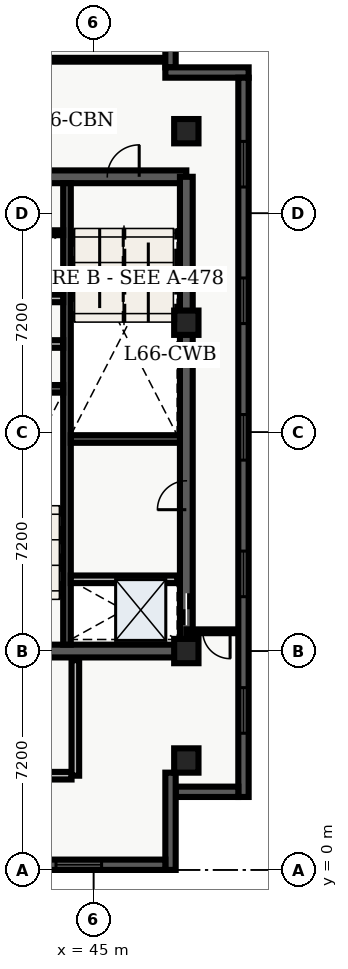
"""IFC4 building model, lengths in metres.
Left out: names, types, materials, properties, quantities, classifications, styles, units other than length and angle.
Written with IfcOpenShell. Run it as: python <this file> out.ifc"""

import sys

from ifc_helpers import new_model, entity, si_unit, converted_unit, direction, frame, origin_with_axes, origin_2d_with_axis, place, context, subcontext, project, spatial, polyline, rectangle, outline, extrude, element, fill, save


model = new_model("IFC4")
c1 = context("Model", 3, precision=1e-05, world=origin_with_axes(), true_north=direction((0.0, 1.0)))
c2 = subcontext(c1, "Body", "Model", "MODEL_VIEW")
j1 = project(units=[si_unit("LENGTHUNIT", "METRE"), converted_unit("PLANEANGLEUNIT", "DEGREE", entity("IfcPlaneAngleMeasure", 0.017), si_unit("PLANEANGLEUNIT", "RADIAN"), dimensions=[0, 0, 0, 0, 0, 0, 0])], contexts=[c1])
p1 = place(None, origin_with_axes())
s1 = spatial("IfcSite", under=j1, at=p1, CompositionType="ELEMENT")
p2 = place(p1, origin_with_axes())
s2 = spatial("IfcBuilding", under=s1, at=p2, CompositionType="ELEMENT")
p3 = place(p2, frame((0.0, 0.0, 268.5), z_axis=(0.0, 0.0, 1.0), x_axis=(1.0, 0.0, 0.0)))
s3 = spatial("IfcBuildingStorey", under=s2, at=p3, CompositionType="ELEMENT", Elevation=268.5)
p4 = place(p3, frame((40.2, 7.2, 0.0), z_axis=(0.0, 0.0, 1.0), x_axis=(1.0, 0.0, 0.0)))
e1 = element("IfcWall", 1, at=p4, inside=s3, PredefinedType="SHEAR", context=c2, shape_type="SweptSolid", body=[
    extrude(outline(polyline([(0.0, -0.21), (7.85, -0.21), (7.85, 0.21), (0.0, 0.21), (0.0, -0.21)])), origin_with_axes(), (0.0, 0.0, 1.0), 3.66),
])
p5 = place(p4, frame((2.175, 0.0, 0.0), z_axis=(0.0, 0.0, 1.0), x_axis=(1.0, 0.0, 0.0)))
e2 = element("IfcOpeningElement", 2, at=p5, cuts=e1, PredefinedType="OPENING", context=c2, shape_type="SweptSolid", body=[
    extrude(rectangle(XDim=1.05, YDim=0.44, at=origin_2d_with_axis()), origin_with_axes(), (0.0, 0.0, 1.0), 2.15),
])
p6 = place(p3, frame((40.2, 22.8, 0.0), z_axis=(0.0, 0.0, 1.0), x_axis=(1.0, 0.0, 0.0)))
e3 = element("IfcWall", 3, at=p6, inside=s3, PredefinedType="SHEAR", context=c2, shape_type="SweptSolid", body=[
    extrude(outline(polyline([(0.0, -0.21), (7.85, -0.21), (7.85, 0.21), (0.0, 0.21), (0.0, -0.21)])), origin_with_axes(), (0.0, 0.0, 1.0), 3.66),
])
p7 = place(p6, frame((5.775, 0.0, 0.0), z_axis=(0.0, 0.0, 1.0), x_axis=(1.0, 0.0, 0.0)))
e4 = element("IfcOpeningElement", 4, at=p7, cuts=e3, PredefinedType="OPENING", context=c2, shape_type="SweptSolid", body=[
    extrude(rectangle(XDim=1.05, YDim=0.44, at=origin_2d_with_axis()), origin_with_axes(), (0.0, 0.0, 1.0), 2.15),
])
p8 = place(p6, frame((2.15, 0.0, 0.0), z_axis=(0.0, 0.0, 1.0), x_axis=(1.0, 0.0, 0.0)))
e5 = element("IfcOpeningElement", 5, at=p8, cuts=e3, PredefinedType="OPENING", context=c2, shape_type="SweptSolid", body=[
    extrude(rectangle(XDim=0.9, YDim=0.44, at=origin_2d_with_axis()), origin_with_axes(), (0.0, 0.0, 1.0), 2.15),
])
p9 = place(p3, frame((48.05, 7.2, 0.0), z_axis=(0.0, 0.0, 1.0), x_axis=(0.0, 1.0, 0.0)))
e6 = element("IfcWall", 6, at=p9, inside=s3, PredefinedType="SHEAR", context=c2, shape_type="SweptSolid", body=[
    extrude(outline(polyline([(0.0, -0.21), (15.6, -0.21), (15.6, 0.21), (0.0, 0.21), (0.0, -0.21)])), origin_with_axes(), (0.0, 0.0, 1.0), 3.66),
])
p10 = place(p9, frame((1.375, 0.0, 0.0), z_axis=(0.0, 0.0, 1.0), x_axis=(1.0, 0.0, 0.0)))
e7 = element("IfcOpeningElement", 7, at=p10, cuts=e6, PredefinedType="OPENING", context=c2, shape_type="SweptSolid", body=[
    extrude(rectangle(XDim=1.05, YDim=0.44, at=origin_2d_with_axis()), origin_with_axes(), (0.0, 0.0, 1.0), 2.15),
])
p11 = place(p9, frame((5.125, 0.0, 0.0), z_axis=(0.0, 0.0, 1.0), x_axis=(1.0, 0.0, 0.0)))
e8 = element("IfcOpeningElement", 8, at=p11, cuts=e6, PredefinedType="OPENING", context=c2, shape_type="SweptSolid", body=[
    extrude(rectangle(XDim=0.95, YDim=0.44, at=origin_2d_with_axis()), origin_with_axes(), (0.0, 0.0, 1.0), 2.15),
])
p12 = place(p3, frame((44.125, 7.41, 0.0), z_axis=(0.0, 0.0, 1.0), x_axis=(0.0, 1.0, 0.0)))
e9 = element("IfcWall", 9, at=p12, inside=s3, PredefinedType="SHEAR", context=c2, shape_type="SweptSolid", body=[
    extrude(outline(polyline([(0.0, -0.125), (15.18, -0.125), (15.18, 0.125), (0.0, 0.125), (0.0, -0.125)])), origin_with_axes(), (0.0, 0.0, 1.0), 3.66),
])
for number, where, z_axis, x_axis in (
    (10, (40.41, 15.825, 0.0), (0.0, 0.0, 1.0), (1.0, 0.0, 0.0)),
    (11, (44.25, 14.175, 0.0), (0.0, 0.0, 1.0), (1.0, 0.0, 0.0)),
):
    element("IfcWall", number, at=place(p3, frame(where, z_axis=z_axis, x_axis=x_axis)), inside=s3, PredefinedType="SHEAR", context=c2, shape_type="SweptSolid", body=[
        extrude(outline(polyline([(0.0, -0.125), (3.59, -0.125), (3.59, 0.125), (0.0, 0.125), (0.0, -0.125)])), origin_with_axes(), (0.0, 0.0, 1.0), 3.66),
    ])
p13 = place(p3, frame((40.5, 17.3, 0.0), z_axis=(0.0, 0.0, 1.0), x_axis=(1.0, 0.0, 0.0)))
e12 = element("IfcWall", 12, at=p13, inside=s3, PredefinedType="SOLIDWALL", context=c2, shape_type="SweptSolid", body=[
    extrude(outline(polyline([(0.0, -0.125), (3.5, -0.125), (3.5, 0.125), (0.0, 0.125), (0.0, -0.125)])), origin_with_axes(), (0.0, 0.0, 1.0), 2.7),
])
p14 = place(p13, frame((2.4, 0.0, 0.0), z_axis=(0.0, 0.0, 1.0), x_axis=(1.0, 0.0, 0.0)))
e13 = element("IfcOpeningElement", 13, at=p14, cuts=e12, PredefinedType="OPENING", context=c2, shape_type="SweptSolid", body=[
    extrude(rectangle(XDim=0.9, YDim=0.27, at=origin_2d_with_axis()), origin_with_axes(), (0.0, 0.0, 1.0), 2.15),
])
p15 = place(p3, frame((40.5, 18.8, 0.0), z_axis=(0.0, 0.0, 1.0), x_axis=(1.0, 0.0, 0.0)))
e14 = element("IfcWall", 14, at=p15, inside=s3, PredefinedType="SOLIDWALL", context=c2, shape_type="SweptSolid", body=[
    extrude(outline(polyline([(0.0, -0.125), (3.5, -0.125), (3.5, 0.125), (0.0, 0.125), (0.0, -0.125)])), origin_with_axes(), (0.0, 0.0, 1.0), 2.7),
])
p16 = place(p3, frame((40.325, 3.1, 0.0), z_axis=(0.0, 0.0, 1.0), x_axis=(1.0, 0.0, 0.0)))
e15 = element("IfcWall", 15, at=p16, inside=s3, PredefinedType="SOLIDWALL", context=c2, shape_type="SweptSolid", body=[
    extrude(outline(polyline([(0.0, -0.125), (3.95, -0.125), (3.95, 0.125), (0.0, 0.125), (0.0, -0.125)])), origin_with_axes(), (0.0, 0.0, 1.0), 2.7),
])
p17 = place(p3, frame((44.4, 3.1, 0.0), z_axis=(0.0, 0.0, 1.0), x_axis=(0.0, 1.0, 0.0)))
e16 = element("IfcWall", 16, at=p17, inside=s3, PredefinedType="SOLIDWALL", context=c2, shape_type="SweptSolid", body=[
    extrude(outline(polyline([(0.0, -0.125), (3.8, -0.125), (3.8, 0.125), (0.0, 0.125), (0.0, -0.125)])), origin_with_axes(), (0.0, 0.0, 1.0), 2.7),
])
for number, where, z_axis, x_axis in (
    (17, (48.05, 3.6, 0.0), (0.0, 0.0, 1.0), (1.0, 0.0, 0.0)),
    (18, (48.05, 7.2, 0.0), (0.0, 0.0, 1.0), (1.0, 0.0, 0.0)),
    (19, (48.05, 18.0, 0.0), (0.0, 0.0, 1.0), (1.0, 0.0, 0.0)),
    (20, (48.05, 24.3, 0.0), (0.0, 0.0, 1.0), (1.0, 0.0, 0.0)),
):
    element("IfcColumn", number, at=place(p3, frame(where, z_axis=z_axis, x_axis=x_axis)), inside=s3, PredefinedType="COLUMN", context=c2, shape_type="SweptSolid", body=[
        extrude(rectangle(XDim=0.8, YDim=0.8, at=origin_2d_with_axis()), origin_with_axes(), (0.0, 0.0, 1.0), 3.9),
    ])
p18 = place(p3, frame((40.5, 20.96, 0.0), z_axis=(0.0, 0.0, 1.0), x_axis=(1.0, 0.0, 0.0)))
e21 = element("IfcWall", 21, at=p18, inside=s3, PredefinedType="PARTITIONING", context=c2, shape_type="SweptSolid", body=[
    extrude(outline(polyline([(0.0, -0.08), (3.5, -0.08), (3.5, 0.08), (0.0, 0.08), (0.0, -0.08)])), origin_with_axes(), (0.0, 0.0, 1.0), 2.7),
])
p19 = place(p3, frame((44.25, 9.56, 0.0), z_axis=(0.0, 0.0, 1.0), x_axis=(1.0, 0.0, 0.0)))
e22 = element("IfcWall", 22, at=p19, inside=s3, PredefinedType="SOLIDWALL", context=c2, shape_type="SweptSolid", body=[
    extrude(outline(polyline([(0.0, -0.125), (3.5, -0.125), (3.5, 0.125), (0.0, 0.125), (0.0, -0.125)])), origin_with_axes(), (0.0, 0.0, 1.0), 2.7),
])
p20 = place(p3, frame((49.765, 7.85, 0.0), z_axis=(0.0, 0.0, 1.0), x_axis=(-1.0, 0.0, 0.0)))
e23 = element("IfcWall", 23, at=p20, inside=s3, PredefinedType="PARTITIONING", context=c2, shape_type="SweptSolid", body=[
    extrude(outline(polyline([(0.0, -0.062), (1.715, -0.062), (1.715, 0.062), (0.0, 0.062), (0.0, -0.062)])), origin_with_axes(), (0.0, 0.0, 1.0), 2.7),
])
p21 = place(p20, frame((0.725, 0.0, 0.0), z_axis=(0.0, 0.0, 1.0), x_axis=(1.0, 0.0, 0.0)))
e24 = element("IfcOpeningElement", 24, at=p21, cuts=e23, PredefinedType="OPENING", context=c2, shape_type="SweptSolid", body=[
    extrude(rectangle(XDim=0.9, YDim=0.145, at=origin_2d_with_axis()), origin_with_axes(), (0.0, 0.0, 1.0), 2.15),
])
p22 = place(p3, frame((34.535, 26.65, 0.0), z_axis=(0.0, 0.0, 1.0), x_axis=(1.0, 0.0, 0.0)))
e25 = element("IfcWall", 25, at=p22, inside=s3, PredefinedType="PARTITIONING", context=c2, shape_type="SweptSolid", body=[
    extrude(outline(polyline([(0.0, -0.062), (12.995, -0.062), (12.995, 0.062), (0.0, 0.062), (0.0, -0.062)])), origin_with_axes(), (0.0, 0.0, 1.0), 2.7),
])
p23 = place(p22, frame((8.465, 0.0, 0.0), z_axis=(0.0, 0.0, 1.0), x_axis=(1.0, 0.0, 0.0)))
e26 = element("IfcOpeningElement", 26, at=p23, cuts=e25, PredefinedType="OPENING", context=c2, shape_type="SweptSolid", body=[
    extrude(rectangle(XDim=1.0, YDim=0.145, at=origin_2d_with_axis()), origin_with_axes(), (0.0, 0.0, 1.0), 2.15),
])
p24 = place(p3, frame((47.53, 28.46, 0.0), z_axis=(0.0, 0.0, 1.0), x_axis=(0.0, -1.0, 0.0)))
e27 = element("IfcWall", 27, at=p24, inside=s3, PredefinedType="SOLIDWALL", context=c2, shape_type="SweptSolid", body=[
    extrude(outline(polyline([(0.0, -0.17), (2.06, -0.17), (2.06, 0.17), (0.0, 0.17), (0.0, -0.17)])), origin_with_axes(), (0.0, 0.0, 1.0), 3.66),
])
p25 = place(p3, frame((47.36, 26.23, 0.0), z_axis=(0.0, 0.0, 1.0), x_axis=(1.0, 0.0, 0.0)))
e28 = element("IfcWall", 28, at=p25, inside=s3, PredefinedType="SOLIDWALL", context=c2, shape_type="SweptSolid", body=[
    extrude(outline(polyline([(0.0, -0.17), (2.74, -0.17), (2.74, 0.17), (0.0, 0.17), (0.0, -0.17)])), origin_with_axes(), (0.0, 0.0, 1.0), 3.66),
])
p26 = place(p3, frame((49.93, 26.06, 0.0), z_axis=(0.0, 0.0, 1.0), x_axis=(0.0, -1.0, 0.0)))
e29 = element("IfcWall", 29, at=p26, inside=s3, PredefinedType="SOLIDWALL", context=c2, shape_type="SweptSolid", body=[
    extrude(outline(polyline([(0.0, -0.17), (23.66, -0.17), (23.66, 0.17), (0.0, 0.17), (0.0, -0.17)])), origin_with_axes(), (0.0, 0.0, 1.0), 3.66),
])
p27 = place(p26, frame((2.846, 0.0, 0.45), z_axis=(0.0, 0.0, 1.0), x_axis=(1.0, 0.0, 0.0)))
e30 = element("IfcOpeningElement", 30, at=p27, cuts=e29, PredefinedType="OPENING", context=c2, shape_type="SweptSolid", body=[
    extrude(rectangle(XDim=1.5, YDim=0.36, at=origin_2d_with_axis()), origin_with_axes(), (0.0, 0.0, 1.0), 2.1),
])
p28 = place(p26, frame((7.338, 0.0, 0.45), z_axis=(0.0, 0.0, 1.0), x_axis=(1.0, 0.0, 0.0)))
e31 = element("IfcOpeningElement", 31, at=p28, cuts=e29, PredefinedType="OPENING", context=c2, shape_type="SweptSolid", body=[
    extrude(rectangle(XDim=1.5, YDim=0.36, at=origin_2d_with_axis()), origin_with_axes(), (0.0, 0.0, 1.0), 2.1),
])
p29 = place(p26, frame((11.83, 0.0, 0.45), z_axis=(0.0, 0.0, 1.0), x_axis=(1.0, 0.0, 0.0)))
e32 = element("IfcOpeningElement", 32, at=p29, cuts=e29, PredefinedType="OPENING", context=c2, shape_type="SweptSolid", body=[
    extrude(rectangle(XDim=1.5, YDim=0.36, at=origin_2d_with_axis()), origin_with_axes(), (0.0, 0.0, 1.0), 2.1),
])
p30 = place(p26, frame((16.322, 0.0, 0.45), z_axis=(0.0, 0.0, 1.0), x_axis=(1.0, 0.0, 0.0)))
e33 = element("IfcOpeningElement", 33, at=p30, cuts=e29, PredefinedType="OPENING", context=c2, shape_type="SweptSolid", body=[
    extrude(rectangle(XDim=1.5, YDim=0.36, at=origin_2d_with_axis()), origin_with_axes(), (0.0, 0.0, 1.0), 2.1),
])
p31 = place(p26, frame((20.814, 0.0, 0.45), z_axis=(0.0, 0.0, 1.0), x_axis=(1.0, 0.0, 0.0)))
e34 = element("IfcOpeningElement", 34, at=p31, cuts=e29, PredefinedType="OPENING", context=c2, shape_type="SweptSolid", body=[
    extrude(rectangle(XDim=1.5, YDim=0.36, at=origin_2d_with_axis()), origin_with_axes(), (0.0, 0.0, 1.0), 2.1),
])
p32 = place(p3, frame((49.76, 2.57, 0.0), z_axis=(0.0, 0.0, 1.0), x_axis=(-1.0, 0.0, 0.0)))
e35 = element("IfcWall", 35, at=p32, inside=s3, PredefinedType="SOLIDWALL", context=c2, shape_type="SweptSolid", body=[
    extrude(outline(polyline([(0.0, -0.17), (2.06, -0.17), (2.06, 0.17), (0.0, 0.17), (0.0, -0.17)])), origin_with_axes(), (0.0, 0.0, 1.0), 3.66),
])
p33 = place(p3, frame((47.53, 3.2, 0.0), z_axis=(0.0, 0.0, 1.0), x_axis=(0.0, -1.0, 0.0)))
e36 = element("IfcWall", 36, at=p33, inside=s3, PredefinedType="SOLIDWALL", context=c2, shape_type="SweptSolid", body=[
    extrude(outline(polyline([(0.0, -0.17), (3.2, -0.17), (3.2, 0.17), (0.0, 0.17), (0.0, -0.17)])), origin_with_axes(), (0.0, 0.0, 1.0), 3.66),
])
p34 = place(p3, frame((47.36, 0.17, 0.0), z_axis=(0.0, 0.0, 1.0), x_axis=(-1.0, 0.0, 0.0)))
e37 = element("IfcWall", 37, at=p34, inside=s3, PredefinedType="SOLIDWALL", context=c2, shape_type="SweptSolid", body=[
    extrude(outline(polyline([(0.0, -0.17), (37.16, -0.17), (37.16, 0.17), (0.0, 0.17), (0.0, -0.17)])), origin_with_axes(), (0.0, 0.0, 1.0), 3.66),
])
p35 = place(p34, frame((2.847, 0.0, 0.45), z_axis=(0.0, 0.0, 1.0), x_axis=(1.0, 0.0, 0.0)))
e38 = element("IfcOpeningElement", 38, at=p35, cuts=e37, PredefinedType="OPENING", context=c2, shape_type="SweptSolid", body=[
    extrude(rectangle(XDim=1.5, YDim=0.36, at=origin_2d_with_axis()), origin_with_axes(), (0.0, 0.0, 1.0), 2.1),
])
p36 = place(p34, frame((7.342, 0.0, 0.45), z_axis=(0.0, 0.0, 1.0), x_axis=(1.0, 0.0, 0.0)))
e39 = element("IfcOpeningElement", 39, at=p36, cuts=e37, PredefinedType="OPENING", context=c2, shape_type="SweptSolid", body=[
    extrude(rectangle(XDim=1.5, YDim=0.36, at=origin_2d_with_axis()), origin_with_axes(), (0.0, 0.0, 1.0), 2.1),
])
p37 = place(p34, frame((11.837, 0.0, 0.45), z_axis=(0.0, 0.0, 1.0), x_axis=(1.0, 0.0, 0.0)))
e40 = element("IfcOpeningElement", 40, at=p37, cuts=e37, PredefinedType="OPENING", context=c2, shape_type="SweptSolid", body=[
    extrude(rectangle(XDim=1.5, YDim=0.36, at=origin_2d_with_axis()), origin_with_axes(), (0.0, 0.0, 1.0), 2.1),
])
p38 = place(p34, frame((16.332, 0.0, 0.45), z_axis=(0.0, 0.0, 1.0), x_axis=(1.0, 0.0, 0.0)))
e41 = element("IfcOpeningElement", 41, at=p38, cuts=e37, PredefinedType="OPENING", context=c2, shape_type="SweptSolid", body=[
    extrude(rectangle(XDim=1.5, YDim=0.36, at=origin_2d_with_axis()), origin_with_axes(), (0.0, 0.0, 1.0), 2.1),
])
p39 = place(p34, frame((20.827, 0.0, 0.45), z_axis=(0.0, 0.0, 1.0), x_axis=(1.0, 0.0, 0.0)))
e42 = element("IfcOpeningElement", 42, at=p39, cuts=e37, PredefinedType="OPENING", context=c2, shape_type="SweptSolid", body=[
    extrude(rectangle(XDim=1.5, YDim=0.36, at=origin_2d_with_axis()), origin_with_axes(), (0.0, 0.0, 1.0), 2.1),
])
p40 = place(p34, frame((25.322, 0.0, 0.45), z_axis=(0.0, 0.0, 1.0), x_axis=(1.0, 0.0, 0.0)))
e43 = element("IfcOpeningElement", 43, at=p40, cuts=e37, PredefinedType="OPENING", context=c2, shape_type="SweptSolid", body=[
    extrude(rectangle(XDim=1.5, YDim=0.36, at=origin_2d_with_axis()), origin_with_axes(), (0.0, 0.0, 1.0), 2.1),
])
p41 = place(p34, frame((29.817, 0.0, 0.45), z_axis=(0.0, 0.0, 1.0), x_axis=(1.0, 0.0, 0.0)))
e44 = element("IfcOpeningElement", 44, at=p41, cuts=e37, PredefinedType="OPENING", context=c2, shape_type="SweptSolid", body=[
    extrude(rectangle(XDim=1.5, YDim=0.36, at=origin_2d_with_axis()), origin_with_axes(), (0.0, 0.0, 1.0), 2.1),
])
p42 = place(p34, frame((34.312, 0.0, 0.45), z_axis=(0.0, 0.0, 1.0), x_axis=(1.0, 0.0, 0.0)))
e45 = element("IfcOpeningElement", 45, at=p42, cuts=e37, PredefinedType="OPENING", context=c2, shape_type="SweptSolid", body=[
    extrude(rectangle(XDim=1.5, YDim=0.36, at=origin_2d_with_axis()), origin_with_axes(), (0.0, 0.0, 1.0), 2.1),
])
p43 = place(p9, frame((1.375, 0.0, 0.0), z_axis=(0.0, 0.0, 1.0), x_axis=(1.0, 0.0, 0.0)))
e46 = element("IfcDoor", 46, at=p43, inside=s3, OperationType="SLIDING_TO_LEFT", PredefinedType="DOOR", context=c2, shape_type="SweptSolid", body=[
    extrude(rectangle(XDim=1.05, YDim=0.09, at=origin_2d_with_axis()), origin_with_axes(), (0.0, 0.0, 1.0), 2.15),
])
fill(e7, e46)
p44 = place(p6, frame((5.775, 0.0, 0.0), z_axis=(0.0, 0.0, 1.0), x_axis=(1.0, 0.0, 0.0)))
e47 = element("IfcDoor", 47, at=p44, inside=s3, OperationType="SINGLE_SWING_RIGHT", PredefinedType="DOOR", context=c2, shape_type="SweptSolid", body=[
    extrude(rectangle(XDim=1.05, YDim=0.09, at=origin_2d_with_axis()), origin_with_axes(), (0.0, 0.0, 1.0), 2.15),
])
fill(e4, e47)
p45 = place(p9, frame((5.125, 0.0, 0.0), z_axis=(0.0, 0.0, 1.0), x_axis=(1.0, 0.0, 0.0)))
e48 = element("IfcDoor", 48, at=p45, inside=s3, OperationType="SINGLE_SWING_LEFT", PredefinedType="DOOR", context=c2, shape_type="SweptSolid", body=[
    extrude(rectangle(XDim=0.95, YDim=0.09, at=origin_2d_with_axis()), origin_with_axes(), (0.0, 0.0, 1.0), 2.15),
])
fill(e8, e48)
p46 = place(p20, frame((0.725, 0.0, 0.0), z_axis=(0.0, 0.0, 1.0), x_axis=(1.0, 0.0, 0.0)))
e49 = element("IfcDoor", 49, at=p46, inside=s3, OperationType="SINGLE_SWING_LEFT", PredefinedType="DOOR", context=c2, shape_type="SweptSolid", body=[
    extrude(rectangle(XDim=0.9, YDim=0.075, at=origin_2d_with_axis()), origin_with_axes(), (0.0, 0.0, 1.0), 2.15),
])
fill(e24, e49)
p47 = place(p26, frame((2.846, 0.0, 0.45), z_axis=(0.0, 0.0, 1.0), x_axis=(1.0, 0.0, 0.0)))
e50 = element("IfcWindow", 50, at=p47, inside=s3, PredefinedType="WINDOW", context=c2, shape_type="SweptSolid", body=[
    extrude(rectangle(XDim=1.5, YDim=0.09, at=origin_2d_with_axis()), origin_with_axes(), (0.0, 0.0, 1.0), 2.1),
])
fill(e30, e50)
p48 = place(p26, frame((7.338, 0.0, 0.45), z_axis=(0.0, 0.0, 1.0), x_axis=(1.0, 0.0, 0.0)))
e51 = element("IfcWindow", 51, at=p48, inside=s3, PredefinedType="WINDOW", context=c2, shape_type="SweptSolid", body=[
    extrude(rectangle(XDim=1.5, YDim=0.09, at=origin_2d_with_axis()), origin_with_axes(), (0.0, 0.0, 1.0), 2.1),
])
fill(e31, e51)
p49 = place(p26, frame((11.83, 0.0, 0.45), z_axis=(0.0, 0.0, 1.0), x_axis=(1.0, 0.0, 0.0)))
e52 = element("IfcWindow", 52, at=p49, inside=s3, PredefinedType="WINDOW", context=c2, shape_type="SweptSolid", body=[
    extrude(rectangle(XDim=1.5, YDim=0.09, at=origin_2d_with_axis()), origin_with_axes(), (0.0, 0.0, 1.0), 2.1),
])
fill(e32, e52)
p50 = place(p26, frame((16.322, 0.0, 0.45), z_axis=(0.0, 0.0, 1.0), x_axis=(1.0, 0.0, 0.0)))
e53 = element("IfcWindow", 53, at=p50, inside=s3, PredefinedType="WINDOW", context=c2, shape_type="SweptSolid", body=[
    extrude(rectangle(XDim=1.5, YDim=0.09, at=origin_2d_with_axis()), origin_with_axes(), (0.0, 0.0, 1.0), 2.1),
])
fill(e33, e53)
p51 = place(p26, frame((20.814, 0.0, 0.45), z_axis=(0.0, 0.0, 1.0), x_axis=(1.0, 0.0, 0.0)))
e54 = element("IfcWindow", 54, at=p51, inside=s3, PredefinedType="WINDOW", context=c2, shape_type="SweptSolid", body=[
    extrude(rectangle(XDim=1.5, YDim=0.09, at=origin_2d_with_axis()), origin_with_axes(), (0.0, 0.0, 1.0), 2.1),
])
fill(e34, e54)
p52 = place(p34, frame((2.847, 0.0, 0.45), z_axis=(0.0, 0.0, 1.0), x_axis=(1.0, 0.0, 0.0)))
e55 = element("IfcWindow", 55, at=p52, inside=s3, PredefinedType="WINDOW", context=c2, shape_type="SweptSolid", body=[
    extrude(rectangle(XDim=1.5, YDim=0.09, at=origin_2d_with_axis()), origin_with_axes(), (0.0, 0.0, 1.0), 2.1),
])
fill(e38, e55)
save(model, sys.argv[1])
